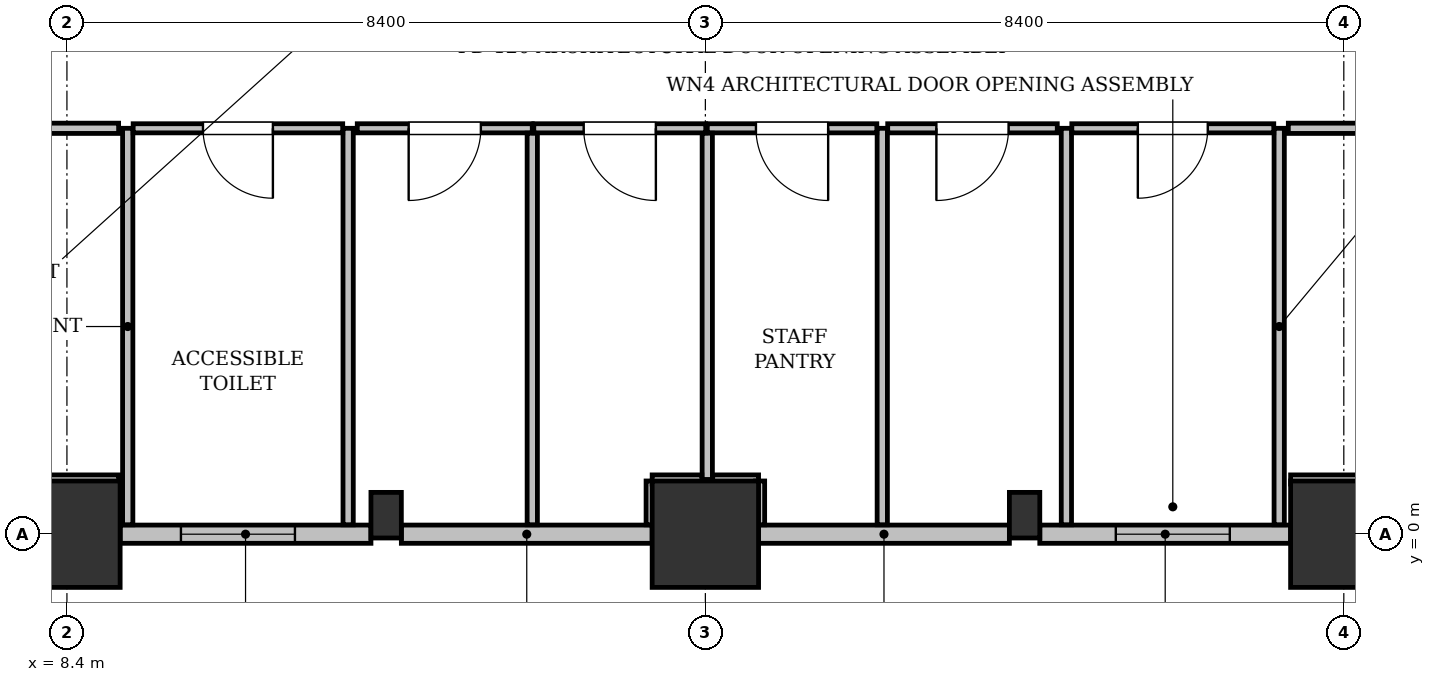
"""IFC4 building model, lengths in metres.
Left out: names, types, materials, properties, quantities, classifications, styles, units other than length and angle.
Written with IfcOpenShell. Run it as: python <this file> out.ifc"""

import sys

from ifc_helpers import new_model, si_unit, direction, frame, frame_2d, origin, origin_2d, place, context, subcontext, project, spatial, rectangle, extrude, element, fill, save


model = new_model("IFC4")
c1 = context("Model", 3, precision=1e-05, world=origin(), true_north=direction((0.0, 1.0)))
c2 = subcontext(c1, "Body", "Model", "MODEL_VIEW")
j1 = project(units=[si_unit("LENGTHUNIT", "METRE"), si_unit("PLANEANGLEUNIT", "RADIAN")], contexts=[c1])
p1 = place(None, origin())
s1 = spatial("IfcSite", under=j1, at=p1, CompositionType="ELEMENT")
p2 = place(p1, origin())
s2 = spatial("IfcBuilding", under=s1, at=p2, CompositionType="ELEMENT")
p3 = place(p2, frame((0.0, 0.0, 10.2)))
s3 = spatial("IfcBuildingStorey", under=s2, at=p3, CompositionType="ELEMENT", Elevation=10.2)
for number, where, z_axis, x_axis in (
    (1, (8.4, 0.0, 0.0), (0.0, 0.0, 1.0), (1.0, 0.0, 0.0)),
    (2, (16.8, 0.0, 0.0), (0.0, 0.0, 1.0), (1.0, 0.0, 0.0)),
    (3, (25.2, 0.0, 0.0), (0.0, 0.0, 1.0), (1.0, 0.0, 0.0)),
):
    element("IfcColumn", number, at=place(p3, frame(where, z_axis=z_axis, x_axis=x_axis)), inside=s3, PredefinedType="COLUMN", context=c2, shape_type="SweptSolid", body=[
        extrude(rectangle(XDim=1.4, YDim=1.4, at=origin_2d()), origin(), (0.0, 0.0, 1.0), 4.8),
    ])
for number, where, z_axis, x_axis in (
    (4, (12.6, 0.25, 0.0), (0.0, 0.0, 1.0), (1.0, 0.0, 0.0)),
    (5, (21.0, 0.25, 0.0), (0.0, 0.0, 1.0), (1.0, 0.0, 0.0)),
):
    element("IfcColumn", number, at=place(p3, frame(where, z_axis=z_axis, x_axis=x_axis)), inside=s3, PredefinedType="PILASTER", context=c2, shape_type="SweptSolid", body=[
        extrude(rectangle(XDim=0.4, YDim=0.6, at=origin_2d()), origin(), (0.0, 0.0, 1.0), 4.8),
    ])
p4 = place(p3, frame((24.5, 0.0, 0.0), z_axis=(0.0, 0.0, 1.0), x_axis=(-1.0, 0.0, 0.0)))
e6 = element("IfcWall", 6, at=p4, inside=s3, PredefinedType="STANDARD", context=c2, shape_type="SweptSolid", body=[
    extrude(rectangle(XDim=3.3, YDim=0.24, at=frame_2d((1.65, 0.0))), origin(), (0.0, 0.0, 1.0), 3.725),
])
p5 = place(p4, frame((0.8, 0.0, 0.9)))
e7 = element("IfcOpeningElement", 7, at=p5, cuts=e6, PredefinedType="OPENING", context=c2, shape_type="SweptSolid", body=[
    extrude(rectangle(XDim=1.5, YDim=1.6, at=frame_2d((0.75, 0.8))), frame((0.0, 0.13, 0.0), z_axis=(0.0, -1.0, 0.0), x_axis=(1.0, 0.0, 0.0)), (0.0, 0.0, 1.0), 0.26),
])
for number, where, z_axis, x_axis in (
    (8, (20.8, 0.0, 0.0), (0.0, 0.0, 1.0), (-1.0, 0.0, 0.0)),
    (9, (16.1, 0.0, 0.0), (0.0, 0.0, 1.0), (-1.0, 0.0, 0.0)),
):
    element("IfcWall", number, at=place(p3, frame(where, z_axis=z_axis, x_axis=x_axis)), inside=s3, PredefinedType="STANDARD", context=c2, shape_type="SweptSolid", body=[
        extrude(rectangle(XDim=3.3, YDim=0.24, at=frame_2d((1.65, 0.0))), origin(), (0.0, 0.0, 1.0), 3.725),
    ])
p6 = place(p3, frame((12.4, 0.0, 0.0), z_axis=(0.0, 0.0, 1.0), x_axis=(-1.0, 0.0, 0.0)))
e10 = element("IfcWall", 10, at=p6, inside=s3, PredefinedType="STANDARD", context=c2, shape_type="SweptSolid", body=[
    extrude(rectangle(XDim=3.3, YDim=0.24, at=frame_2d((1.65, 0.0))), origin(), (0.0, 0.0, 1.0), 3.725),
])
p7 = place(p6, frame((1.0, 0.0, 0.9)))
e11 = element("IfcOpeningElement", 11, at=p7, cuts=e10, PredefinedType="OPENING", context=c2, shape_type="SweptSolid", body=[
    extrude(rectangle(XDim=1.5, YDim=1.6, at=frame_2d((0.75, 0.8))), frame((0.0, 0.13, 0.0), z_axis=(0.0, -1.0, 0.0), x_axis=(1.0, 0.0, 0.0)), (0.0, 0.0, 1.0), 0.26),
])
for number, where, z_axis, x_axis in (
    (12, (9.2, 5.34, 0.0), (0.0, 0.0, 1.0), (0.0, -1.0, 0.0)),
    (13, (12.1, 0.124, 0.0), (0.0, 0.0, 1.0), (0.0, 1.0, 0.0)),
):
    element("IfcWall", number, at=place(p3, frame(where, z_axis=z_axis, x_axis=x_axis)), inside=s3, PredefinedType="PARTITIONING", context=c2, shape_type="SweptSolid", body=[
        extrude(rectangle(XDim=5.216, YDim=0.135, at=frame_2d((2.608, 0.0))), origin(), (0.0, 0.0, 1.0), 4.525),
    ])
p8 = place(p3, frame((12.029, 5.34, 0.0), z_axis=(0.0, 0.0, 1.0), x_axis=(-1.0, 0.0, 0.0)))
e14 = element("IfcWall", 14, at=p8, inside=s3, PredefinedType="PARTITIONING", context=c2, shape_type="SweptSolid", body=[
    extrude(rectangle(XDim=2.757, YDim=0.12, at=frame_2d((1.378, 0.0))), origin(), (0.0, 0.0, 1.0), 4.525),
])
p9 = place(p8, frame((0.918, 0.0, 0.0)))
e15 = element("IfcOpeningElement", 15, at=p9, cuts=e14, PredefinedType="OPENING", context=c2, shape_type="SweptSolid", body=[
    extrude(rectangle(XDim=0.92, YDim=2.1, at=frame_2d((0.46, 1.05))), frame((0.0, 0.07, 0.0), z_axis=(0.0, -1.0, 0.0), x_axis=(1.0, 0.0, 0.0)), (0.0, 0.0, 1.0), 0.14),
])
for number, where, z_axis, x_axis in (
    (16, (21.55, 5.34, 0.0), (0.0, 0.0, 1.0), (0.0, -1.0, 0.0)),
    (17, (24.35, 0.124, 0.0), (0.0, 0.0, 1.0), (0.0, 1.0, 0.0)),
):
    element("IfcWall", number, at=place(p3, frame(where, z_axis=z_axis, x_axis=x_axis)), inside=s3, PredefinedType="PARTITIONING", context=c2, shape_type="SweptSolid", body=[
        extrude(rectangle(XDim=5.216, YDim=0.135, at=frame_2d((2.608, 0.0))), origin(), (0.0, 0.0, 1.0), 4.525),
    ])
p10 = place(p3, frame((24.279, 5.34, 0.0), z_axis=(0.0, 0.0, 1.0), x_axis=(-1.0, 0.0, 0.0)))
e18 = element("IfcWall", 18, at=p10, inside=s3, PredefinedType="PARTITIONING", context=c2, shape_type="SweptSolid", body=[
    extrude(rectangle(XDim=2.657, YDim=0.12, at=frame_2d((1.329, 0.0))), origin(), (0.0, 0.0, 1.0), 4.525),
])
p11 = place(p10, frame((0.868, 0.0, 0.0)))
e19 = element("IfcOpeningElement", 19, at=p11, cuts=e18, PredefinedType="OPENING", context=c2, shape_type="SweptSolid", body=[
    extrude(rectangle(XDim=0.92, YDim=2.1, at=frame_2d((0.46, 1.05))), frame((0.0, 0.07, 0.0), z_axis=(0.0, -1.0, 0.0), x_axis=(1.0, 0.0, 0.0)), (0.0, 0.0, 1.0), 0.14),
])
p12 = place(p3, frame((19.127, 0.124, 0.0), z_axis=(0.0, 0.0, 1.0), x_axis=(0.0, 1.0, 0.0)))
e20 = element("IfcWall", 20, at=p12, inside=s3, PredefinedType="PARTITIONING", context=c2, shape_type="SweptSolid", body=[
    extrude(rectangle(XDim=5.216, YDim=0.135, at=frame_2d((2.608, 0.0))), origin(), (0.0, 0.0, 1.0), 4.525),
])
p13 = place(p3, frame((19.056, 5.34, 0.0), z_axis=(0.0, 0.0, 1.0), x_axis=(-1.0, 0.0, 0.0)))
e21 = element("IfcWall", 21, at=p13, inside=s3, PredefinedType="PARTITIONING", context=c2, shape_type="SweptSolid", body=[
    extrude(rectangle(XDim=2.231, YDim=0.12, at=frame_2d((1.115, 0.0))), origin(), (0.0, 0.0, 1.0), 3.913),
])
p14 = place(p13, frame((0.64, 0.0, 0.0)))
e22 = element("IfcOpeningElement", 22, at=p14, cuts=e21, PredefinedType="OPENING", context=c2, shape_type="SweptSolid", body=[
    extrude(rectangle(XDim=0.95, YDim=2.15, at=frame_2d((0.475, 1.075))), frame((0.0, 0.07, 0.0), z_axis=(0.0, -1.0, 0.0), x_axis=(1.0, 0.0, 0.0)), (0.0, 0.0, 1.0), 0.14),
])
p15 = place(p3, frame((16.825, 5.276, 0.0), z_axis=(0.0, 0.0, 1.0), x_axis=(0.0, -1.0, 0.0)))
e23 = element("IfcWall", 23, at=p15, inside=s3, PredefinedType="PARTITIONING", context=c2, shape_type="SweptSolid", body=[
    extrude(rectangle(XDim=4.556, YDim=0.135, at=frame_2d((2.278, 0.0))), origin(), (0.0, 0.0, 1.0), 3.913),
])
p16 = place(p3, frame((16.896, 0.72, 0.0), z_axis=(0.0, 0.0, 1.0), x_axis=(1.0, 0.0, 0.0)))
e24 = element("IfcWall", 24, at=p16, inside=s3, PredefinedType="PARTITIONING", context=c2, shape_type="SweptSolid", body=[
    extrude(rectangle(XDim=0.604, YDim=0.12, at=frame_2d((0.302, 0.0))), origin(), (0.0, 0.0, 1.0), 4.525),
])
p17 = place(p3, frame((17.52, 0.7, 0.0), z_axis=(0.0, 0.0, 1.0), x_axis=(0.0, -1.0, 0.0)))
e25 = element("IfcWall", 25, at=p17, inside=s3, PredefinedType="PARTITIONING", context=c2, shape_type="SweptSolid", body=[
    extrude(rectangle(XDim=0.576, YDim=0.12, at=frame_2d((0.288, 0.0))), origin(), (0.0, 0.0, 1.0), 4.525),
])
p18 = place(p3, frame((14.522, 5.34, 0.0), z_axis=(0.0, 0.0, 1.0), x_axis=(-1.0, 0.0, 0.0)))
e26 = element("IfcWall", 26, at=p18, inside=s3, PredefinedType="PARTITIONING", context=c2, shape_type="SweptSolid", body=[
    extrude(rectangle(XDim=2.302, YDim=0.12, at=frame_2d((1.151, 0.0))), origin(), (0.0, 0.0, 1.0), 4.122),
])
p19 = place(p18, frame((0.676, 0.0, 0.0)))
e27 = element("IfcOpeningElement", 27, at=p19, cuts=e26, PredefinedType="OPENING", context=c2, shape_type="SweptSolid", body=[
    extrude(rectangle(XDim=0.95, YDim=2.15, at=frame_2d((0.475, 1.075))), frame((0.0, 0.07, 0.0), z_axis=(0.0, -1.0, 0.0), x_axis=(1.0, 0.0, 0.0)), (0.0, 0.0, 1.0), 0.14),
])
p20 = place(p3, frame((14.522, 0.124, 0.0), z_axis=(0.0, 0.0, 1.0), x_axis=(0.0, 1.0, 0.0)))
e28 = element("IfcWall", 28, at=p20, inside=s3, PredefinedType="PARTITIONING", context=c2, shape_type="SweptSolid", body=[
    extrude(rectangle(XDim=5.152, YDim=0.135, at=frame_2d((2.576, 0.0))), origin(), (0.0, 0.0, 1.0), 4.525),
])
p21 = place(p3, frame((16.08, 0.124, 0.0), z_axis=(0.0, 0.0, 1.0), x_axis=(0.0, 1.0, 0.0)))
e29 = element("IfcWall", 29, at=p21, inside=s3, PredefinedType="PARTITIONING", context=c2, shape_type="SweptSolid", body=[
    extrude(rectangle(XDim=0.576, YDim=0.12, at=frame_2d((0.288, 0.0))), origin(), (0.0, 0.0, 1.0), 4.525),
])
p22 = place(p3, frame((16.1, 0.72, 0.0), z_axis=(0.0, 0.0, 1.0), x_axis=(1.0, 0.0, 0.0)))
e30 = element("IfcWall", 30, at=p22, inside=s3, PredefinedType="PARTITIONING", context=c2, shape_type="SweptSolid", body=[
    extrude(rectangle(XDim=0.653, YDim=0.12, at=frame_2d((0.327, 0.0))), origin(), (0.0, 0.0, 1.0), 3.913),
])
p23 = place(p3, frame((16.805, 5.34, 0.0), z_axis=(0.0, 0.0, 1.0), x_axis=(-1.0, 0.0, 0.0)))
e31 = element("IfcWall", 31, at=p23, inside=s3, PredefinedType="PARTITIONING", context=c2, shape_type="SweptSolid", body=[
    extrude(rectangle(XDim=2.262, YDim=0.12, at=frame_2d((1.131, 0.0))), origin(), (0.0, 0.0, 1.0), 3.913),
])
p24 = place(p23, frame((0.656, 0.0, 0.0)))
e32 = element("IfcOpeningElement", 32, at=p24, cuts=e31, PredefinedType="OPENING", context=c2, shape_type="SweptSolid", body=[
    extrude(rectangle(XDim=0.95, YDim=2.15, at=frame_2d((0.475, 1.075))), frame((0.0, 0.07, 0.0), z_axis=(0.0, -1.0, 0.0), x_axis=(1.0, 0.0, 0.0)), (0.0, 0.0, 1.0), 0.14),
])
p25 = place(p3, frame((21.43, 5.34, 0.0), z_axis=(0.0, 0.0, 1.0), x_axis=(-1.0, 0.0, 0.0)))
e33 = element("IfcWall", 33, at=p25, inside=s3, PredefinedType="PARTITIONING", context=c2, shape_type="SweptSolid", body=[
    extrude(rectangle(XDim=2.231, YDim=0.12, at=frame_2d((1.115, 0.0))), origin(), (0.0, 0.0, 1.0), 4.122),
])
p26 = place(p25, frame((0.64, 0.0, 0.0)))
e34 = element("IfcOpeningElement", 34, at=p26, cuts=e33, PredefinedType="OPENING", context=c2, shape_type="SweptSolid", body=[
    extrude(rectangle(XDim=0.95, YDim=2.15, at=frame_2d((0.475, 1.075))), frame((0.0, 0.07, 0.0), z_axis=(0.0, -1.0, 0.0), x_axis=(1.0, 0.0, 0.0)), (0.0, 0.0, 1.0), 0.14),
])
p27 = place(p3, frame((24.5, 0.72, 0.0), z_axis=(0.0, 0.0, 1.0), x_axis=(1.0, 0.0, 0.0)))
e35 = element("IfcWall", 35, at=p27, inside=s3, PredefinedType="PARTITIONING", context=c2, shape_type="SweptSolid", body=[
    extrude(rectangle(XDim=1.4, YDim=0.12, at=frame_2d((0.7, 0.0))), origin(), (0.0, 0.0, 1.0), 3.913),
])
p28 = place(p3, frame((29.329, 5.34, 0.0), z_axis=(0.0, 0.0, 1.0), x_axis=(-1.0, 0.0, 0.0)))
e36 = element("IfcWall", 36, at=p28, inside=s3, PredefinedType="PARTITIONING", context=c2, shape_type="SweptSolid", body=[
    extrude(rectangle(XDim=4.859, YDim=0.135, at=frame_2d((2.429, 0.0))), origin(), (0.0, 0.0, 1.0), 3.913),
])
p29 = place(p28, frame((1.954, 0.0, 0.0)))
e37 = element("IfcOpeningElement", 37, at=p29, cuts=e36, PredefinedType="OPENING", context=c2, shape_type="SweptSolid", body=[
    extrude(rectangle(XDim=0.95, YDim=2.15, at=frame_2d((0.475, 1.075))), frame((0.0, 0.077, 0.0), z_axis=(0.0, -1.0, 0.0), x_axis=(1.0, 0.0, 0.0)), (0.0, 0.0, 1.0), 0.155),
])
p30 = place(p3, frame((7.7, 0.72, 0.0), z_axis=(0.0, 0.0, 1.0), x_axis=(1.0, 0.0, 0.0)))
e38 = element("IfcWall", 38, at=p30, inside=s3, PredefinedType="PARTITIONING", context=c2, shape_type="SweptSolid", body=[
    extrude(rectangle(XDim=1.38, YDim=0.12, at=frame_2d((0.69, 0.0))), origin(), (0.0, 0.0, 1.0), 3.913),
])
p31 = place(p3, frame((9.08, 5.34, 0.0), z_axis=(0.0, 0.0, 1.0), x_axis=(-1.0, 0.0, 0.0)))
e39 = element("IfcWall", 39, at=p31, inside=s3, PredefinedType="PARTITIONING", context=c2, shape_type="SweptSolid", body=[
    extrude(rectangle(XDim=3.68, YDim=0.135, at=frame_2d((1.84, 0.0))), origin(), (0.0, 0.0, 1.0), 3.913),
])
p32 = place(p5, origin())
e40 = element("IfcWindow", 40, at=p32, inside=s3, PartitioningType="SINGLE_PANEL", PredefinedType="WINDOW", context=c2, shape_type="SweptSolid", body=[
    extrude(rectangle(XDim=1.5, YDim=1.6, at=frame_2d((0.75, 0.8))), frame((0.0, 0.03, 0.0), z_axis=(0.0, -1.0, 0.0), x_axis=(1.0, 0.0, 0.0)), (0.0, 0.0, 1.0), 0.06),
])
fill(e7, e40)
p33 = place(p7, origin())
e41 = element("IfcWindow", 41, at=p33, inside=s3, PartitioningType="SINGLE_PANEL", PredefinedType="WINDOW", context=c2, shape_type="SweptSolid", body=[
    extrude(rectangle(XDim=1.5, YDim=1.6, at=frame_2d((0.75, 0.8))), frame((0.0, 0.03, 0.0), z_axis=(0.0, -1.0, 0.0), x_axis=(1.0, 0.0, 0.0)), (0.0, 0.0, 1.0), 0.06),
])
fill(e11, e41)
p34 = place(p9, origin())
e42 = element("IfcDoor", 42, at=p34, inside=s3, OperationType="SINGLE_SWING_LEFT", PredefinedType="DOOR", context=c2, shape_type="SweptSolid", body=[
    extrude(rectangle(XDim=0.92, YDim=2.1, at=frame_2d((0.46, 1.05))), frame((0.0, 0.025, 0.0), z_axis=(0.0, -1.0, 0.0), x_axis=(1.0, 0.0, 0.0)), (0.0, 0.0, 1.0), 0.05),
])
fill(e15, e42)
p35 = place(p11, origin())
e43 = element("IfcDoor", 43, at=p35, inside=s3, OperationType="SINGLE_SWING_RIGHT", PredefinedType="DOOR", context=c2, shape_type="SweptSolid", body=[
    extrude(rectangle(XDim=0.92, YDim=2.1, at=frame_2d((0.46, 1.05))), frame((0.0, 0.025, 0.0), z_axis=(0.0, -1.0, 0.0), x_axis=(1.0, 0.0, 0.0)), (0.0, 0.0, 1.0), 0.05),
])
fill(e19, e43)
p36 = place(p14, origin())
e44 = element("IfcDoor", 44, at=p36, inside=s3, OperationType="SINGLE_SWING_LEFT", PredefinedType="DOOR", context=c2, shape_type="SweptSolid", body=[
    extrude(rectangle(XDim=0.95, YDim=2.15, at=frame_2d((0.475, 1.075))), frame((0.0, 0.025, 0.0), z_axis=(0.0, -1.0, 0.0), x_axis=(1.0, 0.0, 0.0)), (0.0, 0.0, 1.0), 0.05),
])
fill(e22, e44)
p37 = place(p19, origin())
e45 = element("IfcDoor", 45, at=p37, inside=s3, OperationType="SINGLE_SWING_RIGHT", PredefinedType="DOOR", context=c2, shape_type="SweptSolid", body=[
    extrude(rectangle(XDim=0.95, YDim=2.15, at=frame_2d((0.475, 1.075))), frame((0.0, 0.025, 0.0), z_axis=(0.0, -1.0, 0.0), x_axis=(1.0, 0.0, 0.0)), (0.0, 0.0, 1.0), 0.05),
])
fill(e27, e45)
p38 = place(p24, origin())
e46 = element("IfcDoor", 46, at=p38, inside=s3, OperationType="SINGLE_SWING_LEFT", PredefinedType="DOOR", context=c2, shape_type="SweptSolid", body=[
    extrude(rectangle(XDim=0.95, YDim=2.15, at=frame_2d((0.475, 1.075))), frame((0.0, 0.025, 0.0), z_axis=(0.0, -1.0, 0.0), x_axis=(1.0, 0.0, 0.0)), (0.0, 0.0, 1.0), 0.05),
])
fill(e32, e46)
p39 = place(p26, origin())
e47 = element("IfcDoor", 47, at=p39, inside=s3, OperationType="SINGLE_SWING_RIGHT", PredefinedType="DOOR", context=c2, shape_type="SweptSolid", body=[
    extrude(rectangle(XDim=0.95, YDim=2.15, at=frame_2d((0.475, 1.075))), frame((0.0, 0.025, 0.0), z_axis=(0.0, -1.0, 0.0), x_axis=(1.0, 0.0, 0.0)), (0.0, 0.0, 1.0), 0.05),
])
fill(e34, e47)
save(model, sys.argv[1])
